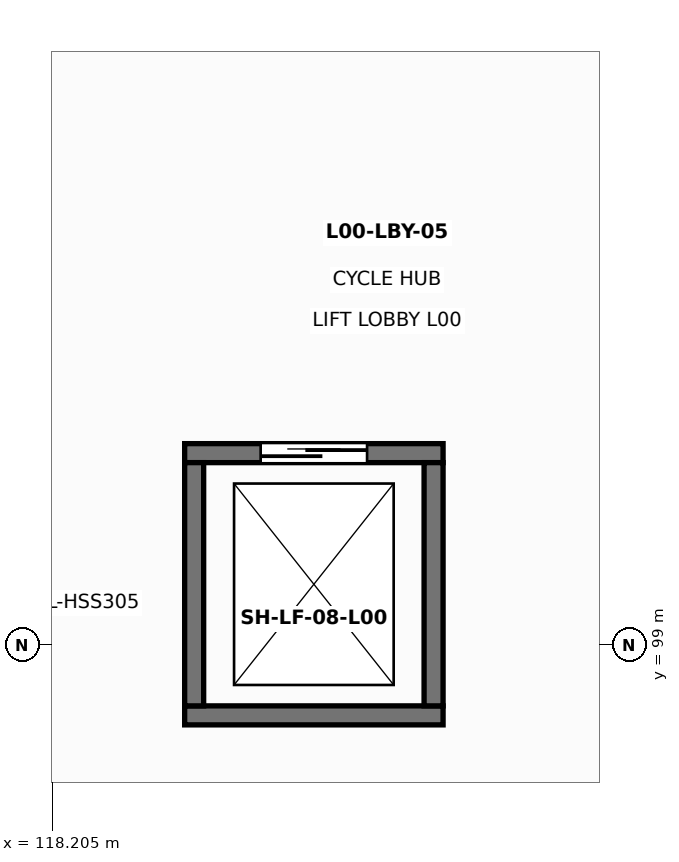
"""IFC4 building model, lengths in metres.
Left out: names, types, materials, properties, quantities, classifications, styles, units other than length and angle.
Written with IfcOpenShell. Run it as: python <this file> out.ifc"""

import sys

from ifc_helpers import new_model, si_unit, direction, frame, frame_2d, origin, place, context, subcontext, project, spatial, rectangle, extrude, element, fill, save


model = new_model("IFC4")
c1 = context("Model", 3, precision=1e-05, world=origin(), true_north=direction((0.0, 1.0)))
c2 = subcontext(c1, "Body", "Model", "MODEL_VIEW")
j1 = project(units=[si_unit("LENGTHUNIT", "METRE"), si_unit("PLANEANGLEUNIT", "RADIAN")], contexts=[c1])
p1 = place(None, origin())
s1 = spatial("IfcSite", under=j1, at=p1, CompositionType="ELEMENT")
p2 = place(p1, origin())
s2 = spatial("IfcBuilding", under=s1, at=p2, CompositionType="ELEMENT")
p3 = place(p2, origin())
s3 = spatial("IfcBuildingStorey", under=s2, at=p3, CompositionType="ELEMENT", Elevation=0.0)
p4 = place(p3, frame((119.95, 98.075, 0.0), z_axis=(0.0, 0.0, 1.0), x_axis=(1.0, 0.0, 0.0)))
e1 = element("IfcWall", 1, at=p4, inside=s3, PredefinedType="SOLIDWALL", context=c2, shape_type="SweptSolid", body=[
    extrude(rectangle(XDim=3.4, YDim=0.25, at=frame_2d((1.7, 0.0))), origin(), (0.0, 0.0, 1.0), 5.755),
])
p5 = place(p3, frame((123.35, 101.525, 0.0), z_axis=(0.0, 0.0, 1.0), x_axis=(-1.0, 0.0, 0.0)))
e2 = element("IfcWall", 2, at=p5, inside=s3, PredefinedType="SOLIDWALL", context=c2, shape_type="SweptSolid", body=[
    extrude(rectangle(XDim=3.4, YDim=0.25, at=frame_2d((1.7, 0.0))), origin(), (0.0, 0.0, 1.0), 5.755),
])
p6 = place(p5, frame((1.0, 0.0, 0.0)))
e3 = element("IfcOpeningElement", 3, at=p6, cuts=e2, PredefinedType="OPENING", context=c2, shape_type="SweptSolid", body=[
    extrude(rectangle(XDim=1.4, YDim=2.25, at=frame_2d((0.7, 1.125))), frame((0.0, 0.135, 0.0), z_axis=(0.0, -1.0, 0.0), x_axis=(1.0, 0.0, 0.0)), (0.0, 0.0, 1.0), 0.27),
])
for number, where, z_axis, x_axis in (
    (4, (123.225, 98.2, 0.0), (0.0, 0.0, 1.0), (0.0, 1.0, 0.0)),
    (5, (120.075, 101.4, 0.0), (0.0, 0.0, 1.0), (0.0, -1.0, 0.0)),
):
    element("IfcWall", number, at=place(p3, frame(where, z_axis=z_axis, x_axis=x_axis)), inside=s3, PredefinedType="SOLIDWALL", context=c2, shape_type="SweptSolid", body=[
        extrude(rectangle(XDim=3.2, YDim=0.25, at=frame_2d((1.6, 0.0))), origin(), (0.0, 0.0, 1.0), 5.755),
    ])
p7 = place(p6, frame((1.4, 0.0, 0.0), z_axis=(0.0, 0.0, 1.0), x_axis=(-1.0, 0.0, 0.0)))
e6 = element("IfcDoor", 6, at=p7, inside=s3, OperationType="DOUBLE_DOOR_SLIDING", PredefinedType="DOOR", context=c2, shape_type="SweptSolid", body=[
    extrude(rectangle(XDim=1.4, YDim=2.25, at=frame_2d((0.7, 1.125))), frame((0.0, 0.025, 0.0), z_axis=(0.0, -1.0, 0.0), x_axis=(1.0, 0.0, 0.0)), (0.0, 0.0, 1.0), 0.05),
])
fill(e3, e6)
save(model, sys.argv[1])
